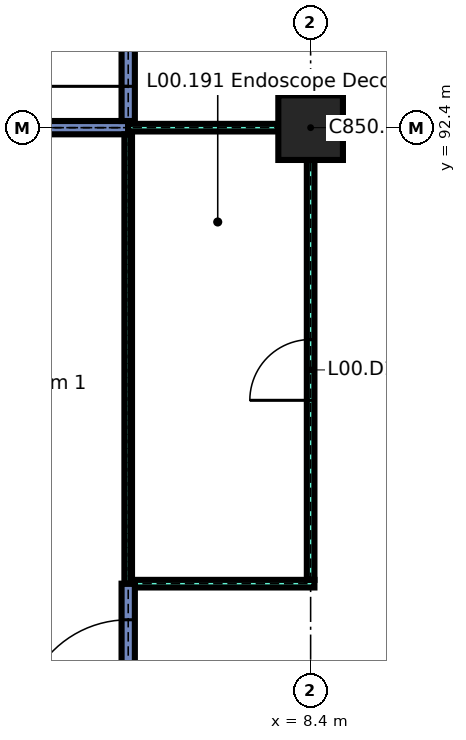
"""IFC4 building model, lengths in metres.
Left out: names, types, materials, properties, quantities, classifications, styles, units other than length and angle.
Written with IfcOpenShell. Run it as: python <this file> out.ifc"""

import sys

from ifc_helpers import new_model, si_unit, direction, frame, frame_2d, origin, origin_2d, place, context, subcontext, project, spatial, rectangle, extrude, element, fill, save


model = new_model("IFC4")
c1 = context("Model", 3, precision=1e-05, world=origin(), true_north=direction((0.0, 1.0)))
c2 = subcontext(c1, "Body", "Model", "MODEL_VIEW")
j1 = project(units=[si_unit("LENGTHUNIT", "METRE"), si_unit("PLANEANGLEUNIT", "RADIAN")], contexts=[c1])
p1 = place(None, origin())
s1 = spatial("IfcSite", under=j1, at=p1, CompositionType="ELEMENT")
p2 = place(p1, origin())
s2 = spatial("IfcBuilding", under=s1, at=p2, CompositionType="ELEMENT")
p3 = place(p2, origin())
s3 = spatial("IfcBuildingStorey", under=s2, at=p3, CompositionType="ELEMENT", Elevation=0.0)
p4 = place(p3, frame((8.4, 92.4, 0.0), z_axis=(0.0, 0.0, 1.0), x_axis=(1.0, 0.0, 0.0)))
e1 = element("IfcColumn", 1, at=p4, inside=s3, PredefinedType="COLUMN", context=c2, shape_type="SweptSolid", body=[
    extrude(rectangle(XDim=0.85, YDim=0.85, at=origin_2d()), origin(), (0.0, 0.0, 1.0), 4.14),
])
p5 = place(p3, frame((6.087, 86.4, 0.0), z_axis=(0.0, 0.0, 1.0), x_axis=(1.0, 0.0, 0.0)))
e2 = element("IfcWall", 2, at=p5, inside=s3, PredefinedType="PARTITIONING", context=c2, shape_type="SweptSolid", body=[
    extrude(rectangle(XDim=2.363, YDim=0.1, at=frame_2d((1.181, 0.0))), origin(), (0.0, 0.0, 1.0), 4.14),
])
p6 = place(p3, frame((0.425, 92.4, 0.0), z_axis=(0.0, 0.0, 1.0), x_axis=(1.0, 0.0, 0.0)))
e3 = element("IfcWall", 3, at=p6, inside=s3, PredefinedType="PARTITIONING", context=c2, shape_type="SweptSolid", body=[
    extrude(rectangle(XDim=5.575, YDim=0.175, at=frame_2d((2.788, 0.0))), origin(), (0.0, 0.0, 1.0), 4.14),
])
p7 = place(p3, frame((6.0, 92.4, 0.0), z_axis=(0.0, 0.0, 1.0), x_axis=(1.0, 0.0, 0.0)))
e4 = element("IfcWall", 4, at=p7, inside=s3, PredefinedType="PARTITIONING", context=c2, shape_type="SweptSolid", body=[
    extrude(rectangle(XDim=1.975, YDim=0.1, at=frame_2d((0.988, 0.0))), origin(), (0.0, 0.0, 1.0), 4.14),
])
p8 = place(p3, frame((6.0, 84.05, 0.0), z_axis=(0.0, 0.0, 1.0), x_axis=(0.0, 1.0, 0.0)))
e5 = element("IfcWall", 5, at=p8, inside=s3, PredefinedType="PARTITIONING", context=c2, shape_type="SweptSolid", body=[
    extrude(rectangle(XDim=2.35, YDim=0.175, at=frame_2d((1.175, 0.0))), origin(), (0.0, 0.0, 1.0), 4.14),
])
p9 = place(p8, frame((0.475, 0.0, 0.0)))
e6 = element("IfcOpeningElement", 6, at=p9, cuts=e5, PredefinedType="OPENING", context=c2, shape_type="SweptSolid", body=[
    extrude(rectangle(XDim=1.4, YDim=2.1, at=frame_2d((0.7, 1.05))), frame((0.0, 0.097, 0.0), z_axis=(0.0, -1.0, 0.0), x_axis=(1.0, 0.0, 0.0)), (0.0, 0.0, 1.0), 0.195),
])
p10 = place(p3, frame((6.0, 86.4, 0.0), z_axis=(0.0, 0.0, 1.0), x_axis=(0.0, 1.0, 0.0)))
e7 = element("IfcWall", 7, at=p10, inside=s3, PredefinedType="PARTITIONING", context=c2, shape_type="SweptSolid", body=[
    extrude(rectangle(XDim=5.913, YDim=0.1, at=frame_2d((2.956, 0.0))), origin(), (0.0, 0.0, 1.0), 4.14),
])
p11 = place(p3, frame((6.0, 92.488, 0.0), z_axis=(0.0, 0.0, 1.0), x_axis=(0.0, 1.0, 0.0)))
e8 = element("IfcWall", 8, at=p11, inside=s3, PredefinedType="PARTITIONING", context=c2, shape_type="SweptSolid", body=[
    extrude(rectangle(XDim=2.312, YDim=0.175, at=frame_2d((1.156, 0.0))), origin(), (0.0, 0.0, 1.0), 4.14),
])
p12 = place(p11, frame((0.456, 0.0, 0.0)))
e9 = element("IfcOpeningElement", 9, at=p12, cuts=e8, PredefinedType="OPENING", context=c2, shape_type="SweptSolid", body=[
    extrude(rectangle(XDim=1.4, YDim=2.1, at=frame_2d((0.7, 1.05))), frame((0.0, 0.097, 0.0), z_axis=(0.0, -1.0, 0.0), x_axis=(1.0, 0.0, 0.0)), (0.0, 0.0, 1.0), 0.195),
])
p13 = place(p3, frame((8.4, 86.45, 0.0), z_axis=(0.0, 0.0, 1.0), x_axis=(0.0, 1.0, 0.0)))
e10 = element("IfcWall", 10, at=p13, inside=s3, PredefinedType="PARTITIONING", context=c2, shape_type="SweptSolid", body=[
    extrude(rectangle(XDim=5.525, YDim=0.1, at=frame_2d((2.763, 0.0))), origin(), (0.0, 0.0, 1.0), 4.14),
])
p14 = place(p13, frame((2.363, 0.0, 0.0)))
e11 = element("IfcOpeningElement", 11, at=p14, cuts=e10, PredefinedType="OPENING", context=c2, shape_type="SweptSolid", body=[
    extrude(rectangle(XDim=0.8, YDim=2.1, at=frame_2d((0.4, 1.05))), frame((0.0, 0.06, 0.0), z_axis=(0.0, -1.0, 0.0), x_axis=(1.0, 0.0, 0.0)), (0.0, 0.0, 1.0), 0.12),
])
p15 = place(p9, origin())
e12 = element("IfcDoor", 12, at=p15, inside=s3, OperationType="SINGLE_SWING_RIGHT", PredefinedType="DOOR", context=c2, shape_type="SweptSolid", body=[
    extrude(rectangle(XDim=1.4, YDim=2.1, at=frame_2d((0.7, 1.05))), frame((0.0, 0.025, 0.0), z_axis=(0.0, -1.0, 0.0), x_axis=(1.0, 0.0, 0.0)), (0.0, 0.0, 1.0), 0.05),
])
fill(e6, e12)
p16 = place(p12, origin())
e13 = element("IfcDoor", 13, at=p16, inside=s3, OperationType="SINGLE_SWING_RIGHT", PredefinedType="DOOR", context=c2, shape_type="SweptSolid", body=[
    extrude(rectangle(XDim=1.4, YDim=2.1, at=frame_2d((0.7, 1.05))), frame((0.0, 0.025, 0.0), z_axis=(0.0, -1.0, 0.0), x_axis=(1.0, 0.0, 0.0)), (0.0, 0.0, 1.0), 0.05),
])
fill(e9, e13)
p17 = place(p14, origin())
e14 = element("IfcDoor", 14, at=p17, inside=s3, OperationType="SINGLE_SWING_RIGHT", PredefinedType="DOOR", context=c2, shape_type="SweptSolid", body=[
    extrude(rectangle(XDim=0.8, YDim=2.1, at=frame_2d((0.4, 1.05))), frame((0.0, 0.02, 0.0), z_axis=(0.0, -1.0, 0.0), x_axis=(1.0, 0.0, 0.0)), (0.0, 0.0, 1.0), 0.04),
])
fill(e11, e14)
save(model, sys.argv[1])
